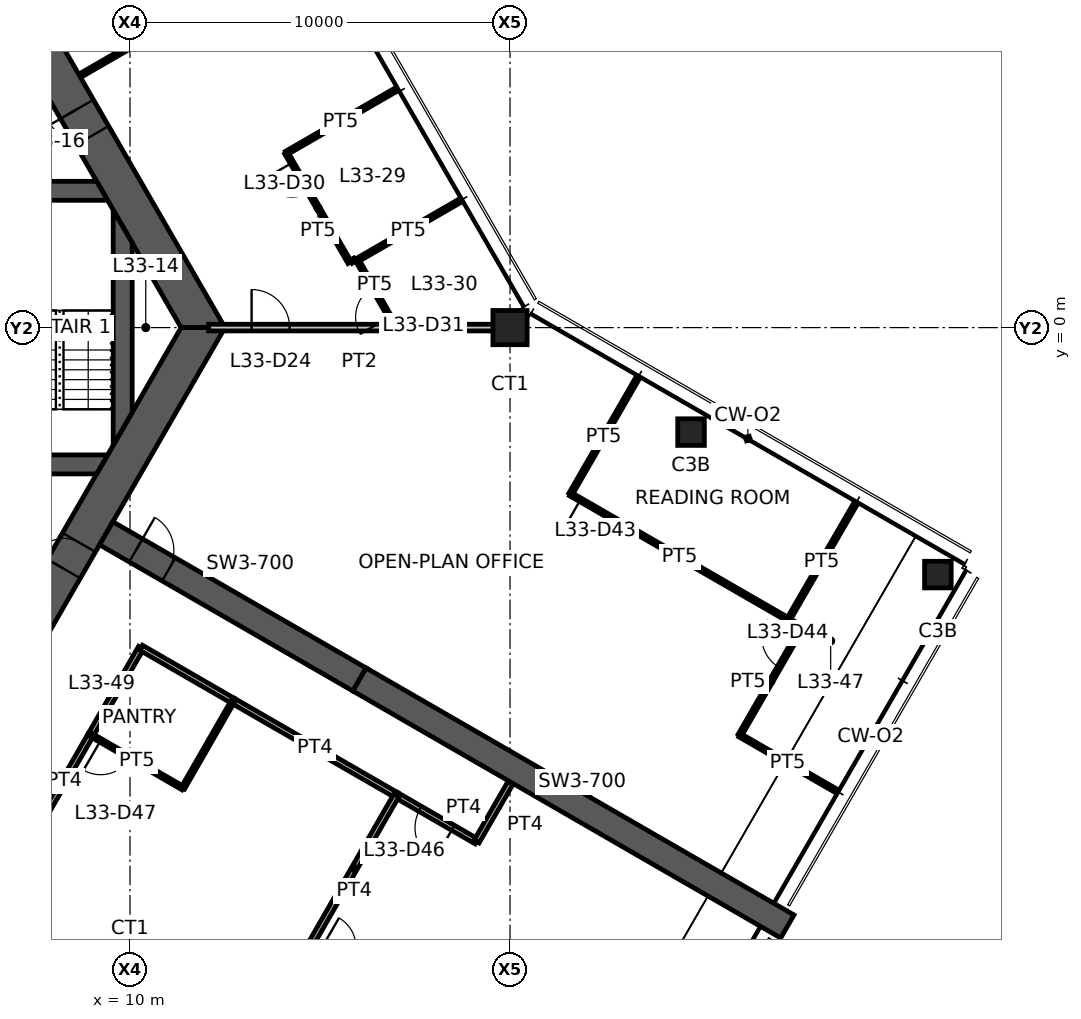
"""IFC4 building model, lengths in metres.
Left out: names, types, materials, properties, quantities, classifications, styles, units other than length and angle.
Written with IfcOpenShell. Run it as: python <this file> out.ifc"""

import sys

from ifc_helpers import new_model, si_unit, direction, frame, frame_2d, origin, origin_2d, place, context, subcontext, project, spatial, polyline, rectangle, hollow_rectangle, outline, extrude, element, fill, save


model = new_model("IFC4")
c1 = context("Model", 3, precision=1e-05, world=origin(), true_north=direction((0.0, 1.0)))
c2 = subcontext(c1, "Body", "Model", "MODEL_VIEW")
j1 = project(units=[si_unit("LENGTHUNIT", "METRE"), si_unit("PLANEANGLEUNIT", "RADIAN")], contexts=[c1])
p1 = place(None, origin())
s1 = spatial("IfcSite", under=j1, at=p1, CompositionType="ELEMENT")
p2 = place(p1, origin())
s2 = spatial("IfcBuilding", under=s1, at=p2, CompositionType="ELEMENT")
p3 = place(p2, frame((0.0, 0.0, 133.1)))
s3 = spatial("IfcBuildingStorey", under=s2, at=p3, CompositionType="ELEMENT", Elevation=133.1)
p4 = place(p3, frame((20.0, 0.0, 0.0), z_axis=(0.0, 0.0, 1.0), x_axis=(1.0, 0.0, 0.0)))
e1 = element("IfcColumn", 1, at=p4, inside=s3, PredefinedType="COLUMN", context=c2, shape_type="SweptSolid", body=[
    extrude(hollow_rectangle(XDim=0.9, YDim=0.9, WallThickness=0.07, at=origin_2d()), origin(), (0.0, 0.0, 1.0), 3.9),
])
for number, where, z_axis, x_axis in (
    (2, (24.763, -2.75, 0.0), (0.0, 0.0, 1.0), (1.0, 0.0, 0.0)),
    (3, (31.258, -6.5, 0.0), (0.0, 0.0, 1.0), (1.0, 0.0, 0.0)),
):
    element("IfcColumn", number, at=place(p3, frame(where, z_axis=z_axis, x_axis=x_axis)), inside=s3, PredefinedType="COLUMN", context=c2, shape_type="SweptSolid", body=[
        extrude(hollow_rectangle(XDim=0.7, YDim=0.7, WallThickness=0.036, at=origin_2d()), origin(), (0.0, 0.0, 1.0), 3.9),
    ])
p5 = place(p3, frame((11.922, 0.0, 0.0), z_axis=(0.0, 0.0, 1.0), x_axis=(-0.500004296715, 0.866022923061, 0.0)))
e4 = element("IfcWall", 4, at=p5, inside=s3, PredefinedType="SHEAR", context=c2, shape_type="SweptSolid", body=[
    extrude(outline(polyline([(-0.289, -0.5), (5.835, -0.5), (6.635, -0.5), (12.211, -0.5), (11.634, 0.5), (6.635, 0.5), (5.835, 0.5), (0.289, 0.5), (-0.289, -0.5)])), origin(), (0.0, 0.0, 1.0), 3.9),
])
p6 = place(p5, frame((5.835, 0.0, 0.0)))
e5 = element("IfcOpeningElement", 5, at=p6, cuts=e4, PredefinedType="OPENING", context=c2, shape_type="SweptSolid", body=[
    extrude(rectangle(XDim=0.8, YDim=2.1, at=frame_2d((0.4, 1.05))), frame((0.0, 0.51, 0.0), z_axis=(0.0, -1.0, 0.0), x_axis=(1.0, 0.0, 0.0)), (0.0, 0.0, 1.0), 1.02),
])
p7 = place(p3, frame((5.961, -10.325, 0.0), z_axis=(0.0, 0.0, 1.0), x_axis=(0.500004296715, 0.866022923061, 0.0)))
e6 = element("IfcWall", 6, at=p7, inside=s3, PredefinedType="SHEAR", context=c2, shape_type="SweptSolid", body=[
    extrude(outline(polyline([(-0.289, -0.5), (4.594, -0.5), (5.394, -0.5), (12.211, -0.5), (11.634, 0.5), (5.394, 0.5), (4.594, 0.5), (0.289, 0.5), (-0.289, -0.5)])), origin(), (0.0, 0.0, 1.0), 3.9),
])
p8 = place(p7, frame((4.594, 0.0, 0.0)))
e7 = element("IfcOpeningElement", 7, at=p8, cuts=e6, PredefinedType="OPENING", context=c2, shape_type="SweptSolid", body=[
    extrude(rectangle(XDim=0.8, YDim=2.1, at=frame_2d((0.4, 1.05))), frame((0.0, 0.51, 0.0), z_axis=(0.0, -1.0, 0.0), x_axis=(1.0, 0.0, 0.0)), (0.0, 0.0, 1.0), 1.02),
])
p9 = place(p3, frame((9.375, -5.413, 0.0), z_axis=(0.0, 0.0, 1.0), x_axis=(0.866032377459, -0.499987921047, 0.0)))
e8 = element("IfcWall", 8, at=p9, inside=s3, PredefinedType="SHEAR", context=c2, shape_type="SweptSolid", body=[
    extrude(rectangle(XDim=7.696, YDim=0.7, at=frame_2d((3.848, 0.0))), origin(), (0.0, 0.0, 1.0), 3.9),
])
p10 = place(p9, frame((0.9, 0.0, 0.0)))
e9 = element("IfcOpeningElement", 9, at=p10, cuts=e8, PredefinedType="OPENING", context=c2, shape_type="SweptSolid", body=[
    extrude(rectangle(XDim=1.0, YDim=2.1, at=frame_2d((0.5, 1.05))), frame((0.0, 0.36, 0.0), z_axis=(0.0, -1.0, 0.0), x_axis=(1.0, 0.0, 0.0)), (0.0, 0.0, 1.0), 0.72),
])
p11 = place(p3, frame((16.039, -9.26, 0.0), z_axis=(0.0, 0.0, 1.0), x_axis=(0.866024837091, -0.50000098154, 0.0)))
e10 = element("IfcWall", 10, at=p11, inside=s3, PredefinedType="SHEAR", context=c2, shape_type="SweptSolid", body=[
    extrude(rectangle(XDim=13.0, YDim=0.7, at=frame_2d((6.5, 0.0))), origin(), (0.0, 0.0, 1.0), 3.9),
])
p12 = place(p3, frame((1.35, 3.6, 0.0), z_axis=(0.0, 0.0, 1.0), x_axis=(1.0, 0.0, 0.0)))
e11 = element("IfcWall", 11, at=p12, inside=s3, PredefinedType="SHEAR", context=c2, shape_type="SweptSolid", body=[
    extrude(outline(polyline([(0.0, -0.25), (3.5, -0.25), (4.8, -0.25), (8.061, -0.25), (7.772, 0.25), (4.8, 0.25), (3.5, 0.25), (0.0, 0.25), (0.0, -0.25)])), origin(), (0.0, 0.0, 1.0), 3.9),
])
p13 = place(p12, frame((3.5, 0.0, 0.0)))
e12 = element("IfcOpeningElement", 12, at=p13, cuts=e11, PredefinedType="OPENING", context=c2, shape_type="SweptSolid", body=[
    extrude(rectangle(XDim=1.3, YDim=2.1, at=frame_2d((0.65, 1.05))), frame((0.0, 0.26, 0.0), z_axis=(0.0, -1.0, 0.0), x_axis=(1.0, 0.0, 0.0)), (0.0, 0.0, 1.0), 0.52),
])
p14 = place(p3, frame((1.35, -3.6, 0.0), z_axis=(0.0, 0.0, 1.0), x_axis=(1.0, 0.0, 0.0)))
e13 = element("IfcWall", 13, at=p14, inside=s3, PredefinedType="SHEAR", context=c2, shape_type="SweptSolid", body=[
    extrude(outline(polyline([(0.0, -0.25), (1.15, -0.25), (2.25, -0.25), (7.772, -0.25), (8.061, 0.25), (2.25, 0.25), (1.15, 0.25), (0.0, 0.25), (0.0, -0.25)])), origin(), (0.0, 0.0, 1.0), 3.9),
])
p15 = place(p14, frame((1.15, 0.0, 0.0)))
e14 = element("IfcOpeningElement", 14, at=p15, cuts=e13, PredefinedType="OPENING", context=c2, shape_type="SweptSolid", body=[
    extrude(rectangle(XDim=1.1, YDim=2.1, at=frame_2d((0.55, 1.05))), frame((0.0, 0.26, 0.0), z_axis=(0.0, -1.0, 0.0), x_axis=(1.0, 0.0, 0.0)), (0.0, 0.0, 1.0), 0.52),
])
p16 = place(p3, frame((9.808, -2.662, 0.0), z_axis=(0.0, 0.0, 1.0), x_axis=(0.0, 1.0, 0.0)))
e15 = element("IfcWall", 15, at=p16, inside=s3, PredefinedType="SHEAR", context=c2, shape_type="SweptSolid", body=[
    extrude(outline(polyline([(0.433, -0.25), (4.892, -0.25), (5.758, 0.25), (-0.433, 0.25), (0.433, -0.25)])), origin(), (0.0, 0.0, 1.0), 3.9),
])
p17 = place(p3, frame((12.07, 0.0, 0.0), z_axis=(0.0, 0.0, 1.0), x_axis=(1.0, 0.0, 0.0)))
e16 = element("IfcWall", 16, at=p17, inside=s3, PredefinedType="PARTITIONING", context=c2, shape_type="SweptSolid", body=[
    extrude(rectangle(XDim=7.93, YDim=0.175, at=frame_2d((3.965, 0.0))), origin(), (0.0, 0.0, 1.0), 3.05),
])
p18 = place(p17, frame((1.13, 0.0, 0.0)))
e17 = element("IfcOpeningElement", 17, at=p18, cuts=e16, PredefinedType="OPENING", context=c2, shape_type="SweptSolid", body=[
    extrude(rectangle(XDim=1.0, YDim=2.1, at=frame_2d((0.5, 1.05))), frame((0.0, 0.098, 0.0), z_axis=(0.0, -1.0, 0.0), x_axis=(1.0, 0.0, 0.0)), (0.0, 0.0, 1.0), 0.195),
])
p19 = place(p3, frame((11.1, 8.025, 0.0), z_axis=(0.0, 0.0, 1.0), x_axis=(-0.866056901187, -0.49994544093, 0.0)))
e18 = element("IfcWall", 18, at=p19, inside=s3, PredefinedType="PARTITIONING", context=c2, shape_type="SweptSolid", body=[
    extrude(rectangle(XDim=2.78, YDim=0.1, at=frame_2d((1.39, 0.0))), origin(), (0.0, 0.0, 1.0), 2.95),
])
p20 = place(p3, frame((18.679, 3.335, 0.0), z_axis=(0.0, 0.0, 1.0), x_axis=(-0.866045268016, -0.499965592563, 0.0)))
e19 = element("IfcWall", 19, at=p20, inside=s3, PredefinedType="PARTITIONING", context=c2, shape_type="SweptSolid", body=[
    extrude(rectangle(XDim=3.129, YDim=0.1, at=frame_2d((1.564, 0.0))), origin(), (0.0, 0.0, 1.0), 2.95),
])
p21 = place(p3, frame((14.114, 4.595, 0.0), z_axis=(0.0, 0.0, 1.0), x_axis=(0.866020751647, 0.500008057651, 0.0)))
e20 = element("IfcWall", 20, at=p21, inside=s3, PredefinedType="PARTITIONING", context=c2, shape_type="SweptSolid", body=[
    extrude(rectangle(XDim=3.305, YDim=0.1, at=frame_2d((1.653, 0.0))), origin(), (0.0, 0.0, 1.0), 2.95),
])
p22 = place(p3, frame((15.779, 1.71, 0.0), z_axis=(0.0, 0.0, 1.0), x_axis=(-0.500001606164, 0.866024476463, 0.0)))
e21 = element("IfcWall", 21, at=p22, inside=s3, PredefinedType="PARTITIONING", context=c2, shape_type="SweptSolid", body=[
    extrude(rectangle(XDim=3.331, YDim=0.1, at=frame_2d((1.666, 0.0))), origin(), (0.0, 0.0, 1.0), 2.95),
])
p23 = place(p22, frame((2.131, 0.0, 0.0)))
e22 = element("IfcOpeningElement", 22, at=p23, cuts=e21, PredefinedType="OPENING", context=c2, shape_type="SweptSolid", body=[
    extrude(rectangle(XDim=0.9, YDim=2.1, at=frame_2d((0.45, 1.05))), frame((0.0, 0.06, 0.0), z_axis=(0.0, -1.0, 0.0), x_axis=(1.0, 0.0, 0.0)), (0.0, 0.0, 1.0), 0.12),
])
p24 = place(p3, frame((16.986, 0.02, 0.0), z_axis=(0.0, 0.0, 1.0), x_axis=(-0.498033790128, 0.86715762344, 0.0)))
e23 = element("IfcWall", 23, at=p24, inside=s3, PredefinedType="PARTITIONING", context=c2, shape_type="SweptSolid", body=[
    extrude(rectangle(XDim=2.025, YDim=0.1, at=frame_2d((1.012, 0.0))), origin(), (0.0, 0.0, 1.0), 2.95),
])
p25 = place(p24, frame((0.3, 0.0, 0.0)))
e24 = element("IfcOpeningElement", 24, at=p25, cuts=e23, PredefinedType="OPENING", context=c2, shape_type="SweptSolid", body=[
    extrude(rectangle(XDim=0.9, YDim=2.1, at=frame_2d((0.45, 1.05))), frame((0.0, 0.06, 0.0), z_axis=(0.0, -1.0, 0.0), x_axis=(1.0, 0.0, 0.0)), (0.0, 0.0, 1.0), 0.12),
])
p26 = place(p3, frame((29.077, -4.658, 0.0), z_axis=(0.0, 0.0, 1.0), x_axis=(-0.501313567819, -0.865265685625, 0.0)))
e25 = element("IfcWall", 25, at=p26, inside=s3, PredefinedType="PARTITIONING", context=c2, shape_type="SweptSolid", body=[
    extrude(rectangle(XDim=3.505, YDim=0.1, at=frame_2d((1.752, 0.0))), origin(), (0.0, 0.0, 1.0), 2.95),
])
p27 = place(p3, frame((21.592, -4.383, 0.0), z_axis=(0.0, 0.0, 1.0), x_axis=(0.500009906705, 0.86601968407, 0.0)))
e26 = element("IfcWall", 26, at=p27, inside=s3, PredefinedType="PARTITIONING", context=c2, shape_type="SweptSolid", body=[
    extrude(rectangle(XDim=3.48, YDim=0.1, at=frame_2d((1.74, 0.0))), origin(), (0.0, 0.0, 1.0), 2.95),
])
p28 = place(p3, frame((27.327, -7.69, 0.0), z_axis=(0.0, 0.0, 1.0), x_axis=(-0.866318796728, 0.499491483847, 0.0)))
e27 = element("IfcWall", 27, at=p28, inside=s3, PredefinedType="PARTITIONING", context=c2, shape_type="SweptSolid", body=[
    extrude(rectangle(XDim=6.62, YDim=0.1, at=frame_2d((3.31, 0.0))), origin(), (0.0, 0.0, 1.0), 2.95),
])
p29 = place(p28, frame((5.42, 0.0, 0.0)))
e28 = element("IfcOpeningElement", 28, at=p29, cuts=e27, PredefinedType="OPENING", context=c2, shape_type="SweptSolid", body=[
    extrude(rectangle(XDim=0.9, YDim=2.1, at=frame_2d((0.45, 1.05))), frame((0.0, 0.06, 0.0), z_axis=(0.0, -1.0, 0.0), x_axis=(1.0, 0.0, 0.0)), (0.0, 0.0, 1.0), 0.12),
])
p30 = place(p3, frame((26.046, -10.727, 0.0), z_axis=(0.0, 0.0, 1.0), x_axis=(0.499765599164, 0.866160692881, 0.0)))
e29 = element("IfcWall", 29, at=p30, inside=s3, PredefinedType="PARTITIONING", context=c2, shape_type="SweptSolid", body=[
    extrude(rectangle(XDim=3.266, YDim=0.1, at=frame_2d((1.633, 0.0))), origin(), (0.0, 0.0, 1.0), 2.95),
])
p31 = place(p30, frame((2.066, 0.0, 0.0)))
e30 = element("IfcOpeningElement", 30, at=p31, cuts=e29, PredefinedType="OPENING", context=c2, shape_type="SweptSolid", body=[
    extrude(rectangle(XDim=0.9, YDim=2.1, at=frame_2d((0.45, 1.05))), frame((0.0, 0.06, 0.0), z_axis=(0.0, -1.0, 0.0), x_axis=(1.0, 0.0, 0.0)), (0.0, 0.0, 1.0), 0.12),
])
p32 = place(p3, frame((27.678, -7.898, 0.0), z_axis=(0.0, 0.0, 1.0), x_axis=(-0.859748322004, 0.510717948394, 0.0)))
e31 = element("IfcWall", 31, at=p32, inside=s3, PredefinedType="PARTITIONING", context=c2, shape_type="SweptSolid", body=[
    extrude(rectangle(XDim=0.409, YDim=0.1, at=frame_2d((0.205, 0.0))), origin(), (0.0, 0.0, 1.0), 2.95),
])
p33 = place(p3, frame((28.562, -12.18, 0.0), z_axis=(0.0, 0.0, 1.0), x_axis=(-0.866031657677, 0.499989167784, 0.0)))
e32 = element("IfcWall", 32, at=p33, inside=s3, PredefinedType="PARTITIONING", context=c2, shape_type="SweptSolid", body=[
    extrude(rectangle(XDim=2.905, YDim=0.1, at=frame_2d((1.453, 0.0))), origin(), (0.0, 0.0, 1.0), 2.95),
])
p34 = place(p3, frame((10.292, -8.425, 0.0), z_axis=(0.0, 0.0, 1.0), x_axis=(-0.499966561876, -0.866044708433, 0.0)))
e33 = element("IfcWall", 33, at=p34, inside=s3, PredefinedType="PARTITIONING", context=c2, shape_type="SweptSolid", body=[
    extrude(rectangle(XDim=2.655, YDim=0.15, at=frame_2d((1.328, 0.0))), origin(), (0.0, 0.0, 1.0), 2.95),
])
p35 = place(p3, frame((12.721, -9.827, 0.0), z_axis=(0.0, 0.0, 1.0), x_axis=(-0.866049342339, 0.499958534914, 0.0)))
e34 = element("IfcWall", 34, at=p35, inside=s3, PredefinedType="PARTITIONING", context=c2, shape_type="SweptSolid", body=[
    extrude(rectangle(XDim=2.805, YDim=0.15, at=frame_2d((1.402, 0.0))), origin(), (0.0, 0.0, 1.0), 2.95),
])
p36 = place(p3, frame((8.969, -10.716, 0.0), z_axis=(0.0, 0.0, 1.0), x_axis=(-0.500008568482, -0.866020456713, 0.0)))
e35 = element("IfcWall", 35, at=p36, inside=s3, PredefinedType="PARTITIONING", context=c2, shape_type="SweptSolid", body=[
    extrude(rectangle(XDim=2.782, YDim=0.15, at=frame_2d((1.391, 0.0))), origin(), (0.0, 0.0, 1.0), 2.95),
])
p37 = place(p3, frame((17.021, -12.31, 0.0), z_axis=(0.0, 0.0, 1.0), x_axis=(-0.866018071205, 0.500012700186, 0.0)))
e36 = element("IfcWall", 36, at=p37, inside=s3, PredefinedType="PARTITIONING", context=c2, shape_type="SweptSolid", body=[
    extrude(rectangle(XDim=4.975, YDim=0.15, at=frame_2d((2.488, 0.0))), origin(), (0.0, 0.0, 1.0), 2.95),
])
p38 = place(p3, frame((19.121, -13.522, 0.0), z_axis=(0.0, 0.0, 1.0), x_axis=(-0.866000196749, 0.500043657324, 0.0)))
e37 = element("IfcWall", 37, at=p38, inside=s3, PredefinedType="PARTITIONING", context=c2, shape_type="SweptSolid", body=[
    extrude(rectangle(XDim=2.434, YDim=0.15, at=frame_2d((1.217, 0.0))), origin(), (0.0, 0.0, 1.0), 2.95),
])
p39 = place(p38, frame((0.717, 0.0, 0.0)))
e38 = element("IfcOpeningElement", 38, at=p39, cuts=e37, PredefinedType="OPENING", context=c2, shape_type="SweptSolid", body=[
    extrude(rectangle(XDim=1.0, YDim=2.1, at=frame_2d((0.5, 1.05))), frame((0.0, 0.085, 0.0), z_axis=(0.0, -1.0, 0.0), x_axis=(1.0, 0.0, 0.0)), (0.0, 0.0, 1.0), 0.17),
])
p40 = place(p3, frame((20.011, -11.981, 0.0), z_axis=(0.0, 0.0, 1.0), x_axis=(-0.500062787734, -0.865989150234, 0.0)))
e39 = element("IfcWall", 39, at=p40, inside=s3, PredefinedType="PARTITIONING", context=c2, shape_type="SweptSolid", body=[
    extrude(rectangle(XDim=1.78, YDim=0.15, at=frame_2d((0.89, 0.0))), origin(), (0.0, 0.0, 1.0), 2.95),
])
p41 = place(p3, frame((11.392, -12.119, 0.0), z_axis=(0.0, 0.0, 1.0), x_axis=(-0.865255114713, 0.501331812737, 0.0)))
e40 = element("IfcWall", 40, at=p41, inside=s3, PredefinedType="PARTITIONING", context=c2, shape_type="SweptSolid", body=[
    extrude(rectangle(XDim=2.8, YDim=0.1, at=frame_2d((1.4, 0.0))), origin(), (0.0, 0.0, 1.0), 2.95),
])
p42 = place(p41, frame((1.6, 0.0, 0.0)))
e41 = element("IfcOpeningElement", 41, at=p42, cuts=e40, PredefinedType="OPENING", context=c2, shape_type="SweptSolid", body=[
    extrude(rectangle(XDim=0.9, YDim=2.1, at=frame_2d((0.45, 1.05))), frame((0.0, 0.06, 0.0), z_axis=(0.0, -1.0, 0.0), x_axis=(1.0, 0.0, 0.0)), (0.0, 0.0, 1.0), 0.12),
])
p43 = place(p3, frame((12.713, -9.822, 0.0), z_axis=(0.0, 0.0, 1.0), x_axis=(-0.49852824611, -0.866873455488, 0.0)))
e42 = element("IfcWall", 42, at=p43, inside=s3, PredefinedType="PARTITIONING", context=c2, shape_type="SweptSolid", body=[
    extrude(rectangle(XDim=2.65, YDim=0.1, at=frame_2d((1.325, 0.0))), origin(), (0.0, 0.0, 1.0), 2.95),
])
p44 = place(p3, frame((17.013, -12.305, 0.0), z_axis=(0.0, 0.0, 1.0), x_axis=(-0.499081704511, -0.866554933182, 0.0)))
e43 = element("IfcWall", 43, at=p44, inside=s3, PredefinedType="PARTITIONING", context=c2, shape_type="SweptSolid", body=[
    extrude(rectangle(XDim=4.454, YDim=0.15, at=frame_2d((2.227, 0.0))), origin(), (0.0, 0.0, 1.0), 2.95),
])
p45 = place(p3, frame((15.823, 1.735, 0.0), z_axis=(0.0, 0.0, 1.0), x_axis=(0.867234405398, 0.497900076415, 0.0)))
e44 = element("IfcWall", 44, at=p45, inside=s3, PredefinedType="PARTITIONING", context=c2, shape_type="SweptSolid", body=[
    extrude(rectangle(XDim=0.104, YDim=0.1, at=frame_2d((0.052, 0.0))), origin(), (0.0, 0.0, 1.0), 2.95),
])
p46 = place(p6, origin())
e45 = element("IfcDoor", 45, at=p46, inside=s3, OperationType="SINGLE_SWING_RIGHT", PredefinedType="DOOR", context=c2, shape_type="SweptSolid", body=[
    extrude(rectangle(XDim=0.8, YDim=2.1, at=frame_2d((0.4, 1.05))), frame((0.0, 0.025, 0.0), z_axis=(0.0, -1.0, 0.0), x_axis=(1.0, 0.0, 0.0)), (0.0, 0.0, 1.0), 0.05),
])
fill(e5, e45)
p47 = place(p8, origin())
e46 = element("IfcDoor", 46, at=p47, inside=s3, OperationType="SINGLE_SWING_LEFT", PredefinedType="DOOR", context=c2, shape_type="SweptSolid", body=[
    extrude(rectangle(XDim=0.8, YDim=2.1, at=frame_2d((0.4, 1.05))), frame((0.0, 0.025, 0.0), z_axis=(0.0, -1.0, 0.0), x_axis=(1.0, 0.0, 0.0)), (0.0, 0.0, 1.0), 0.05),
])
fill(e7, e46)
p48 = place(p10, origin())
e47 = element("IfcDoor", 47, at=p48, inside=s3, OperationType="SINGLE_SWING_LEFT", PredefinedType="DOOR", context=c2, shape_type="SweptSolid", body=[
    extrude(rectangle(XDim=1.0, YDim=2.1, at=frame_2d((0.5, 1.05))), frame((0.0, 0.025, 0.0), z_axis=(0.0, -1.0, 0.0), x_axis=(1.0, 0.0, 0.0)), (0.0, 0.0, 1.0), 0.05),
])
fill(e9, e47)
p49 = place(p18, origin())
e48 = element("IfcDoor", 48, at=p49, inside=s3, OperationType="SINGLE_SWING_LEFT", PredefinedType="DOOR", context=c2, shape_type="SweptSolid", body=[
    extrude(rectangle(XDim=1.0, YDim=2.1, at=frame_2d((0.5, 1.05))), frame((0.0, 0.025, 0.0), z_axis=(0.0, -1.0, 0.0), x_axis=(1.0, 0.0, 0.0)), (0.0, 0.0, 1.0), 0.05),
])
fill(e17, e48)
p50 = place(p23, origin())
e49 = element("IfcDoor", 49, at=p50, inside=s3, OperationType="SINGLE_SWING_RIGHT", PredefinedType="DOOR", context=c2, shape_type="SweptSolid", body=[
    extrude(rectangle(XDim=0.9, YDim=2.1, at=frame_2d((0.45, 1.05))), frame((0.0, 0.025, 0.0), z_axis=(0.0, -1.0, 0.0), x_axis=(1.0, 0.0, 0.0)), (0.0, 0.0, 1.0), 0.05),
])
fill(e22, e49)
p51 = place(p25, origin())
e50 = element("IfcDoor", 50, at=p51, inside=s3, OperationType="SINGLE_SWING_LEFT", PredefinedType="DOOR", context=c2, shape_type="SweptSolid", body=[
    extrude(rectangle(XDim=0.9, YDim=2.1, at=frame_2d((0.45, 1.05))), frame((0.0, 0.025, 0.0), z_axis=(0.0, -1.0, 0.0), x_axis=(1.0, 0.0, 0.0)), (0.0, 0.0, 1.0), 0.05),
])
fill(e24, e50)
p52 = place(p29, origin())
e51 = element("IfcDoor", 51, at=p52, inside=s3, OperationType="SINGLE_SWING_RIGHT", PredefinedType="DOOR", context=c2, shape_type="SweptSolid", body=[
    extrude(rectangle(XDim=0.9, YDim=2.1, at=frame_2d((0.45, 1.05))), frame((0.0, 0.025, 0.0), z_axis=(0.0, -1.0, 0.0), x_axis=(1.0, 0.0, 0.0)), (0.0, 0.0, 1.0), 0.05),
])
fill(e28, e51)
p53 = place(p31, origin())
e52 = element("IfcDoor", 52, at=p53, inside=s3, OperationType="SINGLE_SWING_RIGHT", PredefinedType="DOOR", context=c2, shape_type="SweptSolid", body=[
    extrude(rectangle(XDim=0.9, YDim=2.1, at=frame_2d((0.45, 1.05))), frame((0.0, 0.025, 0.0), z_axis=(0.0, -1.0, 0.0), x_axis=(1.0, 0.0, 0.0)), (0.0, 0.0, 1.0), 0.05),
])
fill(e30, e52)
p54 = place(p39, origin())
e53 = element("IfcDoor", 53, at=p54, inside=s3, OperationType="SINGLE_SWING_LEFT", PredefinedType="DOOR", context=c2, shape_type="SweptSolid", body=[
    extrude(rectangle(XDim=1.0, YDim=2.1, at=frame_2d((0.5, 1.05))), frame((0.0, 0.025, 0.0), z_axis=(0.0, -1.0, 0.0), x_axis=(1.0, 0.0, 0.0)), (0.0, 0.0, 1.0), 0.05),
])
fill(e38, e53)
p55 = place(p42, origin())
e54 = element("IfcDoor", 54, at=p55, inside=s3, OperationType="SINGLE_SWING_RIGHT", PredefinedType="DOOR", context=c2, shape_type="SweptSolid", body=[
    extrude(rectangle(XDim=0.9, YDim=2.1, at=frame_2d((0.45, 1.05))), frame((0.0, 0.025, 0.0), z_axis=(0.0, -1.0, 0.0), x_axis=(1.0, 0.0, 0.0)), (0.0, 0.0, 1.0), 0.05),
])
fill(e41, e54)
save(model, sys.argv[1])
